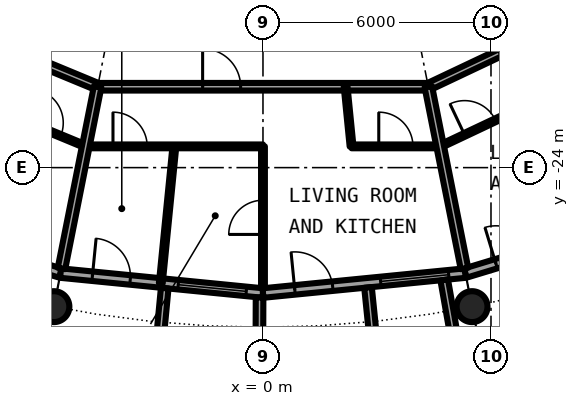
"""IFC4 building model, lengths in metres.
Left out: names, types, materials, properties, quantities, classifications, styles, units other than length and angle.
Written with IfcOpenShell. Run it as: python <this file> out.ifc"""

import sys

from ifc_helpers import new_model, si_unit, direction, frame, frame_2d, origin, origin_2d, place, context, subcontext, project, spatial, rectangle, hollow_circle, extrude, element, fill, save


model = new_model("IFC4")
c1 = context("Model", 3, precision=1e-05, world=origin(), true_north=direction((0.0, 1.0)))
c2 = subcontext(c1, "Body", "Model", "MODEL_VIEW")
j1 = project(units=[si_unit("LENGTHUNIT", "METRE"), si_unit("PLANEANGLEUNIT", "RADIAN")], contexts=[c1])
p1 = place(None, origin())
s1 = spatial("IfcSite", under=j1, at=p1, CompositionType="ELEMENT")
p2 = place(p1, origin())
s2 = spatial("IfcBuilding", under=s1, at=p2, CompositionType="ELEMENT")
p3 = place(p2, frame((0.0, 0.0, 212.7)))
s3 = spatial("IfcBuildingStorey", under=s2, at=p3, CompositionType="ELEMENT", Elevation=212.7)
for number, where, z_axis, x_axis in (
    (1, (-5.501, -27.658, 0.0), (0.0, 0.0, 1.0), (1.0, 0.0, 0.0)),
    (2, (5.501, -27.658, 0.0), (0.0, 0.0, 1.0), (1.0, 0.0, 0.0)),
):
    element("IfcColumn", number, at=place(p3, frame(where, z_axis=z_axis, x_axis=x_axis)), inside=s3, PredefinedType="COLUMN", context=c2, shape_type="SweptSolid", body=[
        extrude(hollow_circle(Radius=0.406, WallThickness=0.03, at=origin_2d()), origin(), (0.0, 0.0, 1.0), 3.05),
    ])
p4 = place(p3, frame((-10.447, -25.222, 0.0), z_axis=(0.0, 0.0, 1.0), x_axis=(0.956965678721, -0.290201119486, 0.0)))
e3 = element("IfcWall", 3, at=p4, inside=s3, PredefinedType="SOLIDWALL", context=c2, shape_type="SweptSolid", body=[
    extrude(rectangle(XDim=5.351, YDim=0.25, at=frame_2d((2.676, 0.0))), origin(), (0.0, 0.0, 1.0), 2.7),
])
p5 = place(p4, frame((0.841, 0.0, 0.0)))
e4 = element("IfcOpeningElement", 4, at=p5, cuts=e3, PredefinedType="OPENING", context=c2, shape_type="SweptSolid", body=[
    extrude(rectangle(XDim=1.0, YDim=2.2, at=frame_2d((0.5, 1.1))), frame((0.0, 0.135, 0.0), z_axis=(0.0, -1.0, 0.0), x_axis=(1.0, 0.0, 0.0)), (0.0, 0.0, 1.0), 0.27),
])
p6 = place(p4, frame((3.111, 0.0, 0.3)))
e5 = element("IfcOpeningElement", 5, at=p6, cuts=e3, PredefinedType="OPENING", context=c2, shape_type="SweptSolid", body=[
    extrude(rectangle(XDim=1.8, YDim=2.1, at=frame_2d((0.9, 1.05))), frame((0.0, 0.135, 0.0), z_axis=(0.0, -1.0, 0.0), x_axis=(1.0, 0.0, 0.0)), (0.0, 0.0, 1.0), 0.27),
])
p7 = place(p3, frame((-5.326, -26.775, 0.0), z_axis=(0.0, 0.0, 1.0), x_axis=(0.995173996315, -0.098126026407, 0.0)))
e6 = element("IfcWall", 6, at=p7, inside=s3, PredefinedType="SOLIDWALL", context=c2, shape_type="SweptSolid", body=[
    extrude(rectangle(XDim=5.352, YDim=0.25, at=frame_2d((2.676, 0.0))), origin(), (0.0, 0.0, 1.0), 2.7),
])
p8 = place(p7, frame((0.841, 0.0, 0.0)))
e7 = element("IfcOpeningElement", 7, at=p8, cuts=e6, PredefinedType="OPENING", context=c2, shape_type="SweptSolid", body=[
    extrude(rectangle(XDim=1.0, YDim=2.2, at=frame_2d((0.5, 1.1))), frame((0.0, 0.135, 0.0), z_axis=(0.0, -1.0, 0.0), x_axis=(1.0, 0.0, 0.0)), (0.0, 0.0, 1.0), 0.27),
])
p9 = place(p7, frame((3.111, 0.0, 0.3)))
e8 = element("IfcOpeningElement", 8, at=p9, cuts=e6, PredefinedType="OPENING", context=c2, shape_type="SweptSolid", body=[
    extrude(rectangle(XDim=1.8, YDim=2.1, at=frame_2d((0.9, 1.05))), frame((0.0, 0.135, 0.0), z_axis=(0.0, -1.0, 0.0), x_axis=(1.0, 0.0, 0.0)), (0.0, 0.0, 1.0), 0.27),
])
p10 = place(p3, frame((-2.586, -27.171, -0.03), z_axis=(0.0, 0.0, 1.0), x_axis=(-0.094548432284, -0.995520262954, 0.0)))
e9 = element("IfcWall", 9, at=p10, inside=s3, PredefinedType="SOLIDWALL", context=c2, shape_type="SweptSolid", body=[
    extrude(rectangle(XDim=3.006, YDim=0.2, at=frame_2d((1.503, 0.0))), origin(), (0.0, 0.0, 1.0), 2.73),
])
p11 = place(p3, frame((-0.09, -27.417, -0.03), z_axis=(0.0, 0.0, 1.0), x_axis=(-0.00347308367, -0.999993968827, 0.0)))
e10 = element("IfcWall", 10, at=p11, inside=s3, PredefinedType="SOLIDWALL", context=c2, shape_type="SweptSolid", body=[
    extrude(rectangle(XDim=2.882, YDim=0.2, at=frame_2d((1.441, 0.0))), origin(), (0.0, 0.0, 1.0), 2.73),
])
p12 = place(p3, frame((0.0, -27.3, 0.0), z_axis=(0.0, 0.0, 1.0), x_axis=(0.995173996315, 0.098126026407, 0.0)))
e11 = element("IfcWall", 11, at=p12, inside=s3, PredefinedType="SOLIDWALL", context=c2, shape_type="SweptSolid", body=[
    extrude(rectangle(XDim=5.352, YDim=0.25, at=frame_2d((2.676, 0.0))), origin(), (0.0, 0.0, 1.0), 2.7),
])
p13 = place(p12, frame((0.841, 0.0, 0.0)))
e12 = element("IfcOpeningElement", 12, at=p13, cuts=e11, PredefinedType="OPENING", context=c2, shape_type="SweptSolid", body=[
    extrude(rectangle(XDim=1.0, YDim=2.2, at=frame_2d((0.5, 1.1))), frame((0.0, 0.135, 0.0), z_axis=(0.0, -1.0, 0.0), x_axis=(1.0, 0.0, 0.0)), (0.0, 0.0, 1.0), 0.27),
])
p14 = place(p12, frame((3.111, 0.0, 0.3)))
e13 = element("IfcOpeningElement", 13, at=p14, cuts=e11, PredefinedType="OPENING", context=c2, shape_type="SweptSolid", body=[
    extrude(rectangle(XDim=1.8, YDim=2.1, at=frame_2d((0.9, 1.05))), frame((0.0, 0.135, 0.0), z_axis=(0.0, -1.0, 0.0), x_axis=(1.0, 0.0, 0.0)), (0.0, 0.0, 1.0), 0.27),
])
p15 = place(p3, frame((2.764, -27.153, -0.03), z_axis=(0.0, 0.0, 1.0), x_axis=(0.101505487237, -0.994834979311, 0.0)))
e14 = element("IfcWall", 14, at=p15, inside=s3, PredefinedType="SOLIDWALL", context=c2, shape_type="SweptSolid", body=[
    extrude(rectangle(XDim=3.007, YDim=0.2, at=frame_2d((1.503, 0.0))), origin(), (0.0, 0.0, 1.0), 2.73),
])
p16 = place(p3, frame((4.769, -26.956, -0.03), z_axis=(0.0, 0.0, 1.0), x_axis=(0.174056778901, -0.984735618183, 0.0)))
e15 = element("IfcWall", 15, at=p16, inside=s3, PredefinedType="SOLIDWALL", context=c2, shape_type="SweptSolid", body=[
    extrude(rectangle(XDim=2.925, YDim=0.2, at=frame_2d((1.462, 0.0))), origin(), (0.0, 0.0, 1.0), 2.73),
])
p17 = place(p3, frame((5.326, -26.775, 0.0), z_axis=(0.0, 0.0, 1.0), x_axis=(0.956965678721, 0.290201119486, 0.0)))
e16 = element("IfcWall", 16, at=p17, inside=s3, PredefinedType="SOLIDWALL", context=c2, shape_type="SweptSolid", body=[
    extrude(rectangle(XDim=5.351, YDim=0.25, at=frame_2d((2.676, 0.0))), origin(), (0.0, 0.0, 1.0), 2.7),
])
p18 = place(p17, frame((0.841, 0.0, 0.0)))
e17 = element("IfcOpeningElement", 17, at=p18, cuts=e16, PredefinedType="OPENING", context=c2, shape_type="SweptSolid", body=[
    extrude(rectangle(XDim=1.0, YDim=2.2, at=frame_2d((0.5, 1.1))), frame((0.0, 0.135, 0.0), z_axis=(0.0, -1.0, 0.0), x_axis=(1.0, 0.0, 0.0)), (0.0, 0.0, 1.0), 0.27),
])
p19 = place(p17, frame((3.111, 0.0, 0.3)))
e18 = element("IfcOpeningElement", 18, at=p19, cuts=e16, PredefinedType="OPENING", context=c2, shape_type="SweptSolid", body=[
    extrude(rectangle(XDim=1.8, YDim=2.1, at=frame_2d((0.9, 1.05))), frame((0.0, 0.135, 0.0), z_axis=(0.0, -1.0, 0.0), x_axis=(1.0, 0.0, 0.0)), (0.0, 0.0, 1.0), 0.27),
])
p20 = place(p3, frame((-6.817, -22.549, 0.0), z_axis=(0.0, 0.0, 1.0), x_axis=(0.923923664861, -0.382576870068, 0.0)))
e19 = element("IfcWall", 19, at=p20, inside=s3, PredefinedType="PARTITIONING", context=c2, shape_type="SweptSolid", body=[
    extrude(rectangle(XDim=2.331, YDim=0.1, at=frame_2d((1.166, 0.0))), origin(), (0.0, 0.0, 1.0), 2.7),
])
p21 = place(p20, frame((0.716, 0.0, 0.0)))
e20 = element("IfcOpeningElement", 20, at=p21, cuts=e19, PredefinedType="OPENING", context=c2, shape_type="SweptSolid", body=[
    extrude(rectangle(XDim=0.9, YDim=2.3, at=frame_2d((0.45, 1.15))), frame((0.0, 0.06, 0.0), z_axis=(0.0, -1.0, 0.0), x_axis=(1.0, 0.0, 0.0)), (0.0, 0.0, 1.0), 0.12),
])
p22 = place(p3, frame((-4.663, -23.441, 0.0), z_axis=(0.0, 0.0, 1.0), x_axis=(1.0, 0.0, 0.0)))
e21 = element("IfcWall", 21, at=p22, inside=s3, PredefinedType="PARTITIONING", context=c2, shape_type="SweptSolid", body=[
    extrude(rectangle(XDim=4.663, YDim=0.1, at=frame_2d((2.332, 0.0))), origin(), (0.0, 0.0, 1.0), 2.7),
])
p23 = place(p22, frame((0.716, 0.0, 0.0)))
e22 = element("IfcOpeningElement", 22, at=p23, cuts=e21, PredefinedType="OPENING", context=c2, shape_type="SweptSolid", body=[
    extrude(rectangle(XDim=0.9, YDim=2.3, at=frame_2d((0.45, 1.15))), frame((0.0, 0.06, 0.0), z_axis=(0.0, -1.0, 0.0), x_axis=(1.0, 0.0, 0.0)), (0.0, 0.0, 1.0), 0.12),
])
p24 = place(p3, frame((2.331, -23.441, 0.0), z_axis=(0.0, 0.0, 1.0), x_axis=(1.0, 0.0, 0.0)))
e23 = element("IfcWall", 23, at=p24, inside=s3, PredefinedType="PARTITIONING", context=c2, shape_type="SweptSolid", body=[
    extrude(rectangle(XDim=2.332, YDim=0.1, at=frame_2d((1.166, 0.0))), origin(), (0.0, 0.0, 1.0), 2.7),
])
p25 = place(p24, frame((0.716, 0.0, 0.0)))
e24 = element("IfcOpeningElement", 24, at=p25, cuts=e23, PredefinedType="OPENING", context=c2, shape_type="SweptSolid", body=[
    extrude(rectangle(XDim=0.9, YDim=2.3, at=frame_2d((0.45, 1.15))), frame((0.0, 0.06, 0.0), z_axis=(0.0, -1.0, 0.0), x_axis=(1.0, 0.0, 0.0)), (0.0, 0.0, 1.0), 0.12),
])
p26 = place(p3, frame((4.663, -23.441, 0.0), z_axis=(0.0, 0.0, 1.0), x_axis=(0.904028696625, 0.427471771791, 0.0)))
e25 = element("IfcWall", 25, at=p26, inside=s3, PredefinedType="PARTITIONING", context=c2, shape_type="SweptSolid", body=[
    extrude(rectangle(XDim=2.323, YDim=0.1, at=frame_2d((1.161, 0.0))), origin(), (0.0, 0.0, 1.0), 2.7),
])
p27 = place(p26, frame((0.711, 0.0, 0.0)))
e26 = element("IfcOpeningElement", 26, at=p27, cuts=e25, PredefinedType="OPENING", context=c2, shape_type="SweptSolid", body=[
    extrude(rectangle(XDim=0.9, YDim=2.3, at=frame_2d((0.45, 1.15))), frame((0.0, 0.06, 0.0), z_axis=(0.0, -1.0, 0.0), x_axis=(1.0, 0.0, 0.0)), (0.0, 0.0, 1.0), 0.12),
])
p28 = place(p3, frame((-12.389, -18.542, 0.0), z_axis=(0.0, 0.0, 1.0), x_axis=(0.923867858178, -0.382711615483, 0.0)))
e27 = element("IfcWall", 27, at=p28, inside=s3, PredefinedType="PARTITIONING", context=c2, shape_type="SweptSolid", body=[
    extrude(rectangle(XDim=8.709, YDim=0.2, at=frame_2d((4.354, 0.0))), origin(), (0.0, 0.0, 1.0), 2.7),
])
p29 = place(p28, frame((2.763, 0.0, 0.0)))
e28 = element("IfcOpeningElement", 28, at=p29, cuts=e27, PredefinedType="OPENING", context=c2, shape_type="SweptSolid", body=[
    extrude(rectangle(XDim=1.0, YDim=2.3, at=frame_2d((0.5, 1.15))), frame((0.0, 0.11, 0.0), z_axis=(0.0, -1.0, 0.0), x_axis=(1.0, 0.0, 0.0)), (0.0, 0.0, 1.0), 0.22),
])
p30 = place(p3, frame((-4.351, -21.872, 0.0), z_axis=(0.0, 0.0, 1.0), x_axis=(1.0, 0.0, 0.0)))
e29 = element("IfcWall", 29, at=p30, inside=s3, PredefinedType="PARTITIONING", context=c2, shape_type="SweptSolid", body=[
    extrude(rectangle(XDim=8.702, YDim=0.2, at=frame_2d((4.351, 0.0))), origin(), (0.0, 0.0, 1.0), 2.7),
])
p31 = place(p30, frame((2.763, 0.0, 0.0)))
e30 = element("IfcOpeningElement", 30, at=p31, cuts=e29, PredefinedType="OPENING", context=c2, shape_type="SweptSolid", body=[
    extrude(rectangle(XDim=1.0, YDim=2.3, at=frame_2d((0.5, 1.15))), frame((0.0, 0.11, 0.0), z_axis=(0.0, -1.0, 0.0), x_axis=(1.0, 0.0, 0.0)), (0.0, 0.0, 1.0), 0.22),
])
p32 = place(p3, frame((4.352, -21.873, 0.0), z_axis=(0.0, 0.0, 1.0), x_axis=(0.903903349022, 0.427736759733, 0.0)))
e31 = element("IfcWall", 31, at=p32, inside=s3, PredefinedType="PARTITIONING", context=c2, shape_type="SweptSolid", body=[
    extrude(rectangle(XDim=10.838, YDim=0.2, at=frame_2d((5.419, 0.0))), origin(), (0.0, 0.0, 1.0), 2.7),
])
p33 = place(p32, frame((4.92, 0.0, 0.0)))
e32 = element("IfcOpeningElement", 32, at=p33, cuts=e31, PredefinedType="OPENING", context=c2, shape_type="SweptSolid", body=[
    extrude(rectangle(XDim=1.0, YDim=2.3, at=frame_2d((0.5, 1.15))), frame((0.0, 0.11, 0.0), z_axis=(0.0, -1.0, 0.0), x_axis=(1.0, 0.0, 0.0)), (0.0, 0.0, 1.0), 0.22),
])
p34 = place(p3, frame((-5.302, -26.653, 0.0), z_axis=(0.0, 0.0, 1.0), x_axis=(0.195075825861, 0.980788163756, 0.0)))
e33 = element("IfcWall", 33, at=p34, inside=s3, PredefinedType="PARTITIONING", context=c2, shape_type="SweptSolid", body=[
    extrude(rectangle(XDim=4.875, YDim=0.2, at=frame_2d((2.438, 0.0))), origin(), (0.0, 0.0, 1.0), 2.7),
])
p35 = place(p3, frame((-2.689, -27.042, 0.0), z_axis=(0.0, 0.0, 1.0), x_axis=(0.098902534616, 0.995097125233, 0.0)))
e34 = element("IfcWall", 34, at=p35, inside=s3, PredefinedType="PARTITIONING", context=c2, shape_type="SweptSolid", body=[
    extrude(rectangle(XDim=3.619, YDim=0.1, at=frame_2d((1.81, 0.0))), origin(), (0.0, 0.0, 1.0), 2.7),
])
p36 = place(p3, frame((0.0, -27.175, 0.0), z_axis=(0.0, 0.0, 1.0), x_axis=(0.0, 1.0, 0.0)))
e35 = element("IfcWall", 35, at=p36, inside=s3, PredefinedType="PARTITIONING", context=c2, shape_type="SweptSolid", body=[
    extrude(rectangle(XDim=3.734, YDim=0.1, at=frame_2d((1.867, 0.0))), origin(), (0.0, 0.0, 1.0), 2.7),
])
p37 = place(p36, frame((1.417, 0.0, 0.0)))
e36 = element("IfcOpeningElement", 36, at=p37, cuts=e35, PredefinedType="OPENING", context=c2, shape_type="SweptSolid", body=[
    extrude(rectangle(XDim=0.9, YDim=2.3, at=frame_2d((0.45, 1.15))), frame((0.0, 0.06, 0.0), z_axis=(0.0, -1.0, 0.0), x_axis=(1.0, 0.0, 0.0)), (0.0, 0.0, 1.0), 0.12),
])
p38 = place(p3, frame((2.175, -21.872, 0.0), z_axis=(0.0, 0.0, 1.0), x_axis=(0.098951748623, -0.995092232632, 0.0)))
e37 = element("IfcWall", 37, at=p38, inside=s3, PredefinedType="PARTITIONING", context=c2, shape_type="SweptSolid", body=[
    extrude(rectangle(XDim=1.577, YDim=0.1, at=frame_2d((0.788, 0.0))), origin(), (0.0, 0.0, 1.0), 2.7),
])
p39 = place(p3, frame((4.351, -21.872, 0.0), z_axis=(0.0, 0.0, 1.0), x_axis=(0.195075825861, -0.980788163756, 0.0)))
e38 = element("IfcWall", 38, at=p39, inside=s3, PredefinedType="PARTITIONING", context=c2, shape_type="SweptSolid", body=[
    extrude(rectangle(XDim=4.875, YDim=0.2, at=frame_2d((2.438, 0.0))), origin(), (0.0, 0.0, 1.0), 2.7),
])
p40 = place(p8, origin())
e39 = element("IfcDoor", 39, at=p40, inside=s3, OperationType="SINGLE_SWING_LEFT", PredefinedType="DOOR", context=c2, shape_type="SweptSolid", body=[
    extrude(rectangle(XDim=1.0, YDim=2.2, at=frame_2d((0.5, 1.1))), frame((0.0, 0.025, 0.0), z_axis=(0.0, -1.0, 0.0), x_axis=(1.0, 0.0, 0.0)), (0.0, 0.0, 1.0), 0.05),
])
fill(e7, e39)
p41 = place(p9, origin())
e40 = element("IfcWindow", 40, at=p41, inside=s3, PartitioningType="SINGLE_PANEL", PredefinedType="WINDOW", context=c2, shape_type="SweptSolid", body=[
    extrude(rectangle(XDim=1.8, YDim=2.1, at=frame_2d((0.9, 1.05))), frame((0.0, 0.03, 0.0), z_axis=(0.0, -1.0, 0.0), x_axis=(1.0, 0.0, 0.0)), (0.0, 0.0, 1.0), 0.06),
])
fill(e8, e40)
p42 = place(p13, origin())
e41 = element("IfcDoor", 41, at=p42, inside=s3, OperationType="SINGLE_SWING_LEFT", PredefinedType="DOOR", context=c2, shape_type="SweptSolid", body=[
    extrude(rectangle(XDim=1.0, YDim=2.2, at=frame_2d((0.5, 1.1))), frame((0.0, 0.025, 0.0), z_axis=(0.0, -1.0, 0.0), x_axis=(1.0, 0.0, 0.0)), (0.0, 0.0, 1.0), 0.05),
])
fill(e12, e41)
p43 = place(p14, origin())
e42 = element("IfcWindow", 42, at=p43, inside=s3, PartitioningType="SINGLE_PANEL", PredefinedType="WINDOW", context=c2, shape_type="SweptSolid", body=[
    extrude(rectangle(XDim=1.8, YDim=2.1, at=frame_2d((0.9, 1.05))), frame((0.0, 0.03, 0.0), z_axis=(0.0, -1.0, 0.0), x_axis=(1.0, 0.0, 0.0)), (0.0, 0.0, 1.0), 0.06),
])
fill(e13, e42)
p44 = place(p18, origin())
e43 = element("IfcDoor", 43, at=p44, inside=s3, OperationType="SINGLE_SWING_LEFT", PredefinedType="DOOR", context=c2, shape_type="SweptSolid", body=[
    extrude(rectangle(XDim=1.0, YDim=2.2, at=frame_2d((0.5, 1.1))), frame((0.0, 0.025, 0.0), z_axis=(0.0, -1.0, 0.0), x_axis=(1.0, 0.0, 0.0)), (0.0, 0.0, 1.0), 0.05),
])
fill(e17, e43)
p45 = place(p21, origin())
e44 = element("IfcDoor", 44, at=p45, inside=s3, OperationType="SINGLE_SWING_LEFT", PredefinedType="DOOR", context=c2, shape_type="SweptSolid", body=[
    extrude(rectangle(XDim=0.9, YDim=2.3, at=frame_2d((0.45, 1.15))), frame((0.0, 0.025, 0.0), z_axis=(0.0, -1.0, 0.0), x_axis=(1.0, 0.0, 0.0)), (0.0, 0.0, 1.0), 0.05),
])
fill(e20, e44)
p46 = place(p31, origin())
e45 = element("IfcDoor", 45, at=p46, inside=s3, OperationType="SINGLE_SWING_LEFT", PredefinedType="DOOR", context=c2, shape_type="SweptSolid", body=[
    extrude(rectangle(XDim=1.0, YDim=2.3, at=frame_2d((0.5, 1.15))), frame((0.0, 0.025, 0.0), z_axis=(0.0, -1.0, 0.0), x_axis=(1.0, 0.0, 0.0)), (0.0, 0.0, 1.0), 0.05),
])
fill(e30, e45)
p47 = place(p25, origin())
e46 = element("IfcDoor", 46, at=p47, inside=s3, OperationType="SINGLE_SWING_LEFT", PredefinedType="DOOR", context=c2, shape_type="SweptSolid", body=[
    extrude(rectangle(XDim=0.9, YDim=2.3, at=frame_2d((0.45, 1.15))), frame((0.0, 0.025, 0.0), z_axis=(0.0, -1.0, 0.0), x_axis=(1.0, 0.0, 0.0)), (0.0, 0.0, 1.0), 0.05),
])
fill(e24, e46)
p48 = place(p37, origin())
e47 = element("IfcDoor", 47, at=p48, inside=s3, OperationType="SINGLE_SWING_RIGHT", PredefinedType="DOOR", context=c2, shape_type="SweptSolid", body=[
    extrude(rectangle(XDim=0.9, YDim=2.3, at=frame_2d((0.45, 1.15))), frame((0.0, 0.025, 0.0), z_axis=(0.0, -1.0, 0.0), x_axis=(1.0, 0.0, 0.0)), (0.0, 0.0, 1.0), 0.05),
])
fill(e36, e47)
p49 = place(p23, origin())
e48 = element("IfcDoor", 48, at=p49, inside=s3, OperationType="SINGLE_SWING_LEFT", PredefinedType="DOOR", context=c2, shape_type="SweptSolid", body=[
    extrude(rectangle(XDim=0.9, YDim=2.3, at=frame_2d((0.45, 1.15))), frame((0.0, 0.025, 0.0), z_axis=(0.0, -1.0, 0.0), x_axis=(1.0, 0.0, 0.0)), (0.0, 0.0, 1.0), 0.05),
])
fill(e22, e48)
p50 = place(p27, origin())
e49 = element("IfcDoor", 49, at=p50, inside=s3, OperationType="SINGLE_SWING_LEFT", PredefinedType="DOOR", context=c2, shape_type="SweptSolid", body=[
    extrude(rectangle(XDim=0.9, YDim=2.3, at=frame_2d((0.45, 1.15))), frame((0.0, 0.025, 0.0), z_axis=(0.0, -1.0, 0.0), x_axis=(1.0, 0.0, 0.0)), (0.0, 0.0, 1.0), 0.05),
])
fill(e26, e49)
save(model, sys.argv[1])
